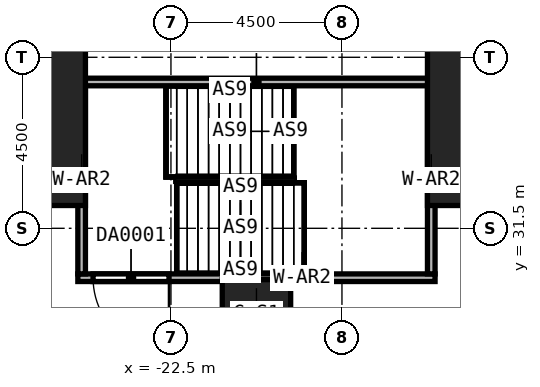
"""IFC4 building model, lengths in metres.
Left out: names, types, materials, properties, quantities, classifications, styles, units other than length and angle.
Written with IfcOpenShell. Run it as: python <this file> out.ifc"""

import sys

from ifc_helpers import new_model, si_unit, direction, frame, frame_2d, origin, origin_2d, place, context, subcontext, project, spatial, rectangle, extrude, element, fill, save


model = new_model("IFC4")
c1 = context("Model", 3, precision=1e-05, world=origin(), true_north=direction((0.0, 1.0)))
c2 = subcontext(c1, "Body", "Model", "MODEL_VIEW")
j1 = project(units=[si_unit("LENGTHUNIT", "METRE"), si_unit("PLANEANGLEUNIT", "RADIAN")], contexts=[c1])
p1 = place(None, origin())
s1 = spatial("IfcSite", under=j1, at=p1, CompositionType="ELEMENT")
p2 = place(p1, origin())
s2 = spatial("IfcBuilding", under=s1, at=p2, CompositionType="ELEMENT")
p3 = place(p2, origin())
s3 = spatial("IfcBuildingStorey", under=s2, at=p3, CompositionType="ELEMENT", Elevation=0.0)
for number, where, z_axis, x_axis in (
    (1, (-27.0, 35.55, 0.0), (0.0, 0.0, 1.0), (1.0, 0.0, 0.0)),
    (2, (-13.5, 35.55, 0.0), (0.0, 0.0, 1.0), (1.0, 0.0, 0.0)),
):
    element("IfcColumn", number, at=place(p3, frame(where, z_axis=z_axis, x_axis=x_axis)), inside=s3, PredefinedType="COLUMN", context=c2, shape_type="SweptSolid", body=[
        extrude(rectangle(XDim=4.5, YDim=6.9, at=origin_2d()), origin(), (0.0, 0.0, 1.0), 12.0),
    ])
p4 = place(p3, frame((-20.25, 29.25, 0.0), z_axis=(0.0, 0.0, 1.0), x_axis=(1.0, 0.0, 0.0)))
e3 = element("IfcColumn", 3, at=p4, inside=s3, PredefinedType="COLUMN", context=c2, shape_type="SweptSolid", body=[
    extrude(rectangle(XDim=1.8, YDim=1.8, at=origin_2d()), origin(), (0.0, 0.0, 1.0), 12.0),
])
p5 = place(p3, frame((-15.55, 30.2, 0.0), z_axis=(0.0, 0.0, 1.0), x_axis=(-1.0, 0.0, 0.0)))
e4 = element("IfcWall", 4, at=p5, inside=s3, PredefinedType="SOLIDWALL", context=c2, shape_type="SweptSolid", body=[
    extrude(rectangle(XDim=9.4, YDim=0.2, at=frame_2d((4.7, 0.0))), origin(), (0.0, 0.0, 1.0), 12.0),
])
p6 = place(p5, frame((7.0, 0.0, 0.0)))
e5 = element("IfcOpeningElement", 5, at=p6, cuts=e4, PredefinedType="OPENING", context=c2, shape_type="SweptSolid", body=[
    extrude(rectangle(XDim=2.0, YDim=2.4, at=frame_2d((1.0, 1.2))), frame((0.0, 0.1, 0.0), z_axis=(0.0, -1.0, 0.0), x_axis=(1.0, 0.0, 0.0)), (0.0, 0.0, 1.0), 0.2),
])
p7 = place(p3, frame((-24.95, 35.35, 0.0), z_axis=(0.0, 0.0, 1.0), x_axis=(1.0, 0.0, 0.0)))
e6 = element("IfcWall", 6, at=p7, inside=s3, PredefinedType="SOLIDWALL", context=c2, shape_type="SweptSolid", body=[
    extrude(rectangle(XDim=9.4, YDim=0.2, at=frame_2d((4.7, 0.0))), origin(), (0.0, 0.0, 1.0), 12.0),
])
for number, where, z_axis, x_axis in (
    (7, (-24.85, 30.3, 0.0), (0.0, 0.0, 1.0), (0.0, 1.0, 0.0)),
    (8, (-15.65, 30.3, 0.0), (0.0, 0.0, 1.0), (0.0, 1.0, 0.0)),
):
    element("IfcWall", number, at=place(p3, frame(where, z_axis=z_axis, x_axis=x_axis)), inside=s3, PredefinedType="SOLIDWALL", context=c2, shape_type="SweptSolid", body=[
        extrude(rectangle(XDim=4.95, YDim=0.2, at=frame_2d((2.475, 0.0))), origin(), (0.0, 0.0, 1.0), 12.0),
    ])
p8 = place(p6, origin())
e9 = element("IfcDoor", 9, at=p8, inside=s3, OperationType="DOUBLE_DOOR_SINGLE_SWING", PredefinedType="DOOR", context=c2, shape_type="SweptSolid", body=[
    extrude(rectangle(XDim=2.0, YDim=2.4, at=frame_2d((1.0, 1.2))), frame((0.0, 0.025, 0.0), z_axis=(0.0, -1.0, 0.0), x_axis=(1.0, 0.0, 0.0)), (0.0, 0.0, 1.0), 0.05),
])
fill(e5, e9)
save(model, sys.argv[1])
